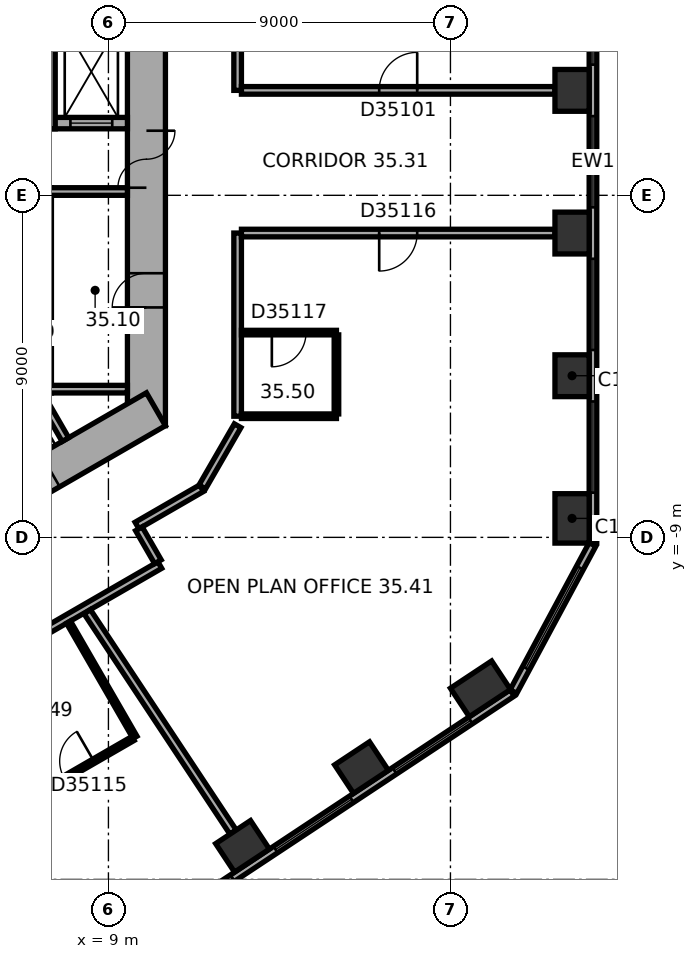
"""IFC4 building model, lengths in metres.
Left out: names, types, materials, properties, quantities, classifications, styles, units other than length and angle.
Written with IfcOpenShell. Run it as: python <this file> out.ifc"""

import sys

from ifc_helpers import new_model, si_unit, direction, frame, frame_2d, origin, origin_2d, place, context, subcontext, project, spatial, rectangle, extrude, element, fill, save


model = new_model("IFC4")
c1 = context("Model", 3, precision=1e-05, world=origin(), true_north=direction((0.0, 1.0)))
c2 = subcontext(c1, "Body", "Model", "MODEL_VIEW")
j1 = project(units=[si_unit("LENGTHUNIT", "METRE"), si_unit("PLANEANGLEUNIT", "RADIAN")], contexts=[c1])
p1 = place(None, origin())
s1 = spatial("IfcSite", under=j1, at=p1, CompositionType="ELEMENT")
p2 = place(p1, origin())
s2 = spatial("IfcBuilding", under=s1, at=p2, CompositionType="ELEMENT")
p3 = place(p2, frame((0.0, 0.0, 146.6)))
s3 = spatial("IfcBuildingStorey", under=s2, at=p3, CompositionType="ELEMENT", Elevation=146.6)
p4 = place(p3, frame((21.2, -8.501, 0.0), z_axis=(0.0, 0.0, 1.0), x_axis=(0.0, 1.0, 0.0)))
e1 = element("IfcColumn", 1, at=p4, inside=s3, PredefinedType="COLUMN", context=c2, shape_type="SweptSolid", body=[
    extrude(rectangle(XDim=1.3, YDim=0.9, at=origin_2d()), origin(), (0.0, 0.0, 1.0), 3.7),
])
for number, where, z_axis, x_axis in (
    (2, (21.2, -4.747, 0.0), (0.0, 0.0, 1.0), (0.0, 1.0, 0.0)),
    (3, (21.2, -0.993, 0.0), (0.0, 0.0, 1.0), (0.0, 1.0, 0.0)),
    (4, (21.2, 2.761, 0.0), (0.0, 0.0, 1.0), (0.0, 1.0, 0.0)),
    (5, (12.529, -17.13, 0.0), (0.0, 0.0, 1.0), (0.834, 0.552, 0.0)),
    (6, (15.659, -15.058, 0.0), (0.0, 0.0, 1.0), (0.834, 0.552, 0.0)),
):
    element("IfcColumn", number, at=place(p3, frame(where, z_axis=z_axis, x_axis=x_axis)), inside=s3, PredefinedType="COLUMN", context=c2, shape_type="SweptSolid", body=[
        extrude(rectangle(XDim=1.1, YDim=0.9, at=origin_2d()), origin(), (0.0, 0.0, 1.0), 3.7),
    ])
p5 = place(p3, frame((18.79, -12.986, 0.0), z_axis=(0.0, 0.0, 1.0), x_axis=(0.833885822067, 0.551936985312, 0.0)))
e7 = element("IfcColumn", 7, at=p5, inside=s3, PredefinedType="COLUMN", context=c2, shape_type="SweptSolid", body=[
    extrude(rectangle(XDim=1.3, YDim=0.9, at=origin_2d()), origin(), (0.0, 0.0, 1.0), 3.7),
])
p6 = place(p3, frame((10.0, -6.062, 0.0), z_axis=(0.0, 0.0, 1.0), x_axis=(0.0, 1.0, 0.0)))
e8 = element("IfcWall", 8, at=p6, inside=s3, PredefinedType="SHEAR", context=c2, shape_type="SweptSolid", body=[
    extrude(rectangle(XDim=12.125, YDim=1.0, at=frame_2d((6.062, 0.0))), origin(), (0.0, 0.0, 1.0), 3.7),
])
p7 = place(p6, frame((6.262, 0.0, 0.0)))
e9 = element("IfcOpeningElement", 9, at=p7, cuts=e8, PredefinedType="OPENING", context=c2, shape_type="SweptSolid", body=[
    extrude(rectangle(XDim=1.5, YDim=2.1, at=frame_2d((0.75, 1.05))), frame((0.0, 0.51, 0.0), z_axis=(0.0, -1.0, 0.0), x_axis=(1.0, 0.0, 0.0)), (0.0, 0.0, 1.0), 1.02),
])
p8 = place(p6, frame((3.112, 0.0, 0.0)))
e10 = element("IfcOpeningElement", 10, at=p8, cuts=e8, PredefinedType="OPENING", context=c2, shape_type="SweptSolid", body=[
    extrude(rectangle(XDim=0.9, YDim=2.1, at=frame_2d((0.45, 1.05))), frame((0.0, 0.51, 0.0), z_axis=(0.0, -1.0, 0.0), x_axis=(1.0, 0.0, 0.0)), (0.0, 0.0, 1.0), 1.02),
])
p9 = place(p3, frame((-0.25, -11.691, 0.0), z_axis=(0.0, 0.0, 1.0), x_axis=(0.866022616891, 0.50000482701, 0.0)))
e11 = element("IfcWall", 11, at=p9, inside=s3, PredefinedType="SHEAR", context=c2, shape_type="SweptSolid", body=[
    extrude(rectangle(XDim=12.125, YDim=1.0, at=frame_2d((6.062, 0.0))), origin(), (0.0, 0.0, 1.0), 3.7),
])
p10 = place(p9, frame((2.612, 0.0, 0.0)))
e12 = element("IfcOpeningElement", 12, at=p10, cuts=e11, PredefinedType="OPENING", context=c2, shape_type="SweptSolid", body=[
    extrude(rectangle(XDim=1.1, YDim=2.1, at=frame_2d((0.55, 1.05))), frame((0.0, 0.51, 0.0), z_axis=(0.0, -1.0, 0.0), x_axis=(1.0, 0.0, 0.0)), (0.0, 0.0, 1.0), 1.02),
])
p11 = place(p9, frame((5.212, 0.0, 0.0)))
e13 = element("IfcOpeningElement", 13, at=p11, cuts=e11, PredefinedType="OPENING", context=c2, shape_type="SweptSolid", body=[
    extrude(rectangle(XDim=1.1, YDim=2.1, at=frame_2d((0.55, 1.05))), frame((0.0, 0.51, 0.0), z_axis=(0.0, -1.0, 0.0), x_axis=(1.0, 0.0, 0.0)), (0.0, 0.0, 1.0), 1.02),
])
p12 = place(p9, frame((7.812, 0.0, 0.0)))
e14 = element("IfcOpeningElement", 14, at=p12, cuts=e11, PredefinedType="OPENING", context=c2, shape_type="SweptSolid", body=[
    extrude(rectangle(XDim=1.1, YDim=2.1, at=frame_2d((0.55, 1.05))), frame((0.0, 0.51, 0.0), z_axis=(0.0, -1.0, 0.0), x_axis=(1.0, 0.0, 0.0)), (0.0, 0.0, 1.0), 1.02),
])
p13 = place(p3, frame((21.75, -9.138, 0.0), z_axis=(0.0, 0.0, 1.0), x_axis=(0.0, 1.0, 0.0)))
e15 = element("IfcWall", 15, at=p13, inside=s3, PredefinedType="STANDARD", context=c2, shape_type="SweptSolid", body=[
    extrude(rectangle(XDim=20.044, YDim=0.2, at=frame_2d((10.022, 0.0))), origin(), (0.0, 0.0, 1.0), 3.7),
])
p14 = place(p13, frame((1.314, 0.0, 0.9)))
e16 = element("IfcOpeningElement", 16, at=p14, cuts=e15, PredefinedType="OPENING", context=c2, shape_type="SweptSolid", body=[
    extrude(rectangle(XDim=2.4, YDim=2.0, at=frame_2d((1.2, 1.0))), frame((0.0, 0.11, 0.0), z_axis=(0.0, -1.0, 0.0), x_axis=(1.0, 0.0, 0.0)), (0.0, 0.0, 1.0), 0.22),
])
p15 = place(p13, frame((5.069, 0.0, 0.9)))
e17 = element("IfcOpeningElement", 17, at=p15, cuts=e15, PredefinedType="OPENING", context=c2, shape_type="SweptSolid", body=[
    extrude(rectangle(XDim=2.4, YDim=2.0, at=frame_2d((1.2, 1.0))), frame((0.0, 0.11, 0.0), z_axis=(0.0, -1.0, 0.0), x_axis=(1.0, 0.0, 0.0)), (0.0, 0.0, 1.0), 0.22),
])
p16 = place(p13, frame((8.823, 0.0, 0.9)))
e18 = element("IfcOpeningElement", 18, at=p16, cuts=e15, PredefinedType="OPENING", context=c2, shape_type="SweptSolid", body=[
    extrude(rectangle(XDim=2.4, YDim=2.0, at=frame_2d((1.2, 1.0))), frame((0.0, 0.11, 0.0), z_axis=(0.0, -1.0, 0.0), x_axis=(1.0, 0.0, 0.0)), (0.0, 0.0, 1.0), 0.22),
])
p17 = place(p13, frame((12.577, 0.0, 0.9)))
e19 = element("IfcOpeningElement", 19, at=p17, cuts=e15, PredefinedType="OPENING", context=c2, shape_type="SweptSolid", body=[
    extrude(rectangle(XDim=2.4, YDim=2.0, at=frame_2d((1.2, 1.0))), frame((0.0, 0.11, 0.0), z_axis=(0.0, -1.0, 0.0), x_axis=(1.0, 0.0, 0.0)), (0.0, 0.0, 1.0), 0.22),
])
p18 = place(p13, frame((16.331, 0.0, 0.9)))
e20 = element("IfcOpeningElement", 20, at=p18, cuts=e15, PredefinedType="OPENING", context=c2, shape_type="SweptSolid", body=[
    extrude(rectangle(XDim=2.4, YDim=2.0, at=frame_2d((1.2, 1.0))), frame((0.0, 0.11, 0.0), z_axis=(0.0, -1.0, 0.0), x_axis=(1.0, 0.0, 0.0)), (0.0, 0.0, 1.0), 0.22),
])
p19 = place(p3, frame((2.911, -24.156, 0.0), z_axis=(0.0, 0.0, 1.0), x_axis=(0.833882163564, 0.551942512668, 0.0)))
e21 = element("IfcWall", 21, at=p19, inside=s3, PredefinedType="STANDARD", context=c2, shape_type="SweptSolid", body=[
    extrude(rectangle(XDim=20.044, YDim=0.2, at=frame_2d((10.022, 0.0))), origin(), (0.0, 0.0, 1.0), 3.7),
])
p20 = place(p19, frame((1.313, 0.0, 0.9)))
e22 = element("IfcOpeningElement", 22, at=p20, cuts=e21, PredefinedType="OPENING", context=c2, shape_type="SweptSolid", body=[
    extrude(rectangle(XDim=2.4, YDim=2.0, at=frame_2d((1.2, 1.0))), frame((0.0, 0.11, 0.0), z_axis=(0.0, -1.0, 0.0), x_axis=(1.0, 0.0, 0.0)), (0.0, 0.0, 1.0), 0.22),
])
p21 = place(p19, frame((5.067, 0.0, 0.9)))
e23 = element("IfcOpeningElement", 23, at=p21, cuts=e21, PredefinedType="OPENING", context=c2, shape_type="SweptSolid", body=[
    extrude(rectangle(XDim=2.4, YDim=2.0, at=frame_2d((1.2, 1.0))), frame((0.0, 0.11, 0.0), z_axis=(0.0, -1.0, 0.0), x_axis=(1.0, 0.0, 0.0)), (0.0, 0.0, 1.0), 0.22),
])
p22 = place(p19, frame((8.821, 0.0, 0.9)))
e24 = element("IfcOpeningElement", 24, at=p22, cuts=e21, PredefinedType="OPENING", context=c2, shape_type="SweptSolid", body=[
    extrude(rectangle(XDim=2.4, YDim=2.0, at=frame_2d((1.2, 1.0))), frame((0.0, 0.11, 0.0), z_axis=(0.0, -1.0, 0.0), x_axis=(1.0, 0.0, 0.0)), (0.0, 0.0, 1.0), 0.22),
])
p23 = place(p19, frame((12.575, 0.0, 0.9)))
e25 = element("IfcOpeningElement", 25, at=p23, cuts=e21, PredefinedType="OPENING", context=c2, shape_type="SweptSolid", body=[
    extrude(rectangle(XDim=2.4, YDim=2.0, at=frame_2d((1.2, 1.0))), frame((0.0, 0.11, 0.0), z_axis=(0.0, -1.0, 0.0), x_axis=(1.0, 0.0, 0.0)), (0.0, 0.0, 1.0), 0.22),
])
p24 = place(p19, frame((16.329, 0.0, 0.9)))
e26 = element("IfcOpeningElement", 26, at=p24, cuts=e21, PredefinedType="OPENING", context=c2, shape_type="SweptSolid", body=[
    extrude(rectangle(XDim=2.4, YDim=2.0, at=frame_2d((1.2, 1.0))), frame((0.0, 0.11, 0.0), z_axis=(0.0, -1.0, 0.0), x_axis=(1.0, 0.0, 0.0)), (0.0, 0.0, 1.0), 0.22),
])
p25 = place(p3, frame((19.658, -13.057, 0.0), z_axis=(0.0, 0.0, 1.0), x_axis=(0.473307879841, 0.880897071672, 0.0)))
e27 = element("IfcWall", 27, at=p25, inside=s3, PredefinedType="STANDARD", context=c2, shape_type="SweptSolid", body=[
    extrude(rectangle(XDim=4.395, YDim=0.2, at=frame_2d((2.197, 0.0))), origin(), (0.0, 0.0, 1.0), 3.7),
])
p26 = place(p25, frame((0.698, 0.0, 0.9)))
e28 = element("IfcOpeningElement", 28, at=p26, cuts=e27, PredefinedType="OPENING", context=c2, shape_type="SweptSolid", body=[
    extrude(rectangle(XDim=3.0, YDim=2.0, at=frame_2d((1.5, 1.0))), frame((0.0, 0.11, 0.0), z_axis=(0.0, -1.0, 0.0), x_axis=(1.0, 0.0, 0.0)), (0.0, 0.0, 1.0), 0.22),
])
for number, where, z_axis, x_axis in (
    (29, (7.3, -5.1, 0.0), (0.0, 0.0, 1.0), (1.0, 0.0, 0.0)),
    (30, (7.3, 0.1, 0.0), (0.0, 0.0, 1.0), (1.0, 0.0, 0.0)),
    (31, (6.768, -4.522, 0.0), (0.0, 0.0, 1.0), (0.5, -0.866, 0.0)),
):
    element("IfcWall", number, at=place(p3, frame(where, z_axis=z_axis, x_axis=x_axis)), inside=s3, PredefinedType="PARTITIONING", context=c2, shape_type="SweptSolid", body=[
        extrude(rectangle(XDim=2.2, YDim=0.2, at=frame_2d((1.1, 0.0))), origin(), (0.0, 0.0, 1.0), 3.42),
    ])
p27 = place(p3, frame((7.3, 1.9, 0.0), z_axis=(0.0, 0.0, 1.0), x_axis=(1.0, 0.0, 0.0)))
e32 = element("IfcWall", 32, at=p27, inside=s3, PredefinedType="SHEAR", context=c2, shape_type="SweptSolid", body=[
    extrude(rectangle(XDim=2.2, YDim=0.3, at=frame_2d((1.1, 0.0))), origin(), (0.0, 0.0, 1.0), 3.42),
])
p28 = place(p27, frame((0.7, 0.0, 0.0)))
e33 = element("IfcOpeningElement", 33, at=p28, cuts=e32, PredefinedType="OPENING", context=c2, shape_type="SweptSolid", body=[
    extrude(rectangle(XDim=1.1, YDim=2.1, at=frame_2d((0.55, 1.05))), frame((0.0, 0.16, 0.0), z_axis=(0.0, -1.0, 0.0), x_axis=(1.0, 0.0, 0.0)), (0.0, 0.0, 1.0), 0.32),
])
p29 = place(p3, frame((7.45, 1.75, 0.0), z_axis=(0.0, 0.0, 1.0), x_axis=(0.0, 1.0, 0.0)))
e34 = element("IfcWall", 34, at=p29, inside=s3, PredefinedType="SHEAR", context=c2, shape_type="SweptSolid", body=[
    extrude(rectangle(XDim=3.35, YDim=0.3, at=frame_2d((1.675, 0.0))), origin(), (0.0, 0.0, 1.0), 3.42),
])
p30 = place(p3, frame((4.955, -12.844, 0.0), z_axis=(0.0, 0.0, 1.0), x_axis=(0.86602379309, 0.500002789795, 0.0)))
e35 = element("IfcWall", 35, at=p30, inside=s3, PredefinedType="PARTITIONING", context=c2, shape_type="SweptSolid", body=[
    extrude(rectangle(XDim=6.232, YDim=0.2, at=frame_2d((3.116, 0.0))), origin(), (0.0, 0.0, 1.0), 3.42),
])
p31 = place(p3, frame((7.949, -11.231, 0.0), z_axis=(0.0, 0.0, 1.0), x_axis=(0.500010275428, -0.866019471182, 0.0)))
e36 = element("IfcWall", 36, at=p31, inside=s3, PredefinedType="PARTITIONING", context=c2, shape_type="SweptSolid", body=[
    extrude(rectangle(XDim=3.5, YDim=0.12, at=frame_2d((1.75, 0.0))), origin(), (0.0, 0.0, 1.0), 3.42),
])
p32 = place(p3, frame((9.647, -14.292, 0.0), z_axis=(0.0, 0.0, 1.0), x_axis=(-0.866040564224, -0.499973740429, 0.0)))
e37 = element("IfcWall", 37, at=p32, inside=s3, PredefinedType="PARTITIONING", context=c2, shape_type="SweptSolid", body=[
    extrude(rectangle(XDim=3.28, YDim=0.12, at=frame_2d((1.64, 0.0))), origin(), (0.0, 0.0, 1.0), 3.42),
])
p33 = place(p32, frame((1.19, 0.0, 0.0)))
e38 = element("IfcOpeningElement", 38, at=p33, cuts=e37, PredefinedType="OPENING", context=c2, shape_type="SweptSolid", body=[
    extrude(rectangle(XDim=0.9, YDim=2.1, at=frame_2d((0.45, 1.05))), frame((0.0, 0.07, 0.0), z_axis=(0.0, -1.0, 0.0), x_axis=(1.0, 0.0, 0.0)), (0.0, 0.0, 1.0), 0.14),
])
p34 = place(p3, frame((9.752, -8.688, 0.0), z_axis=(0.0, 0.0, 1.0), x_axis=(0.865974105138, 0.500088841337, 0.0)))
e39 = element("IfcWall", 39, at=p34, inside=s3, PredefinedType="PARTITIONING", context=c2, shape_type="SweptSolid", body=[
    extrude(rectangle(XDim=1.961, YDim=0.2, at=frame_2d((0.98, 0.0))), origin(), (0.0, 0.0, 1.0), 3.42),
])
p35 = place(p3, frame((10.302, -9.642, 0.0), z_axis=(0.0, 0.0, 1.0), x_axis=(-0.500074377092, 0.865982457891, 0.0)))
e40 = element("IfcWall", 40, at=p35, inside=s3, PredefinedType="PARTITIONING", context=c2, shape_type="SweptSolid", body=[
    extrude(rectangle(XDim=1.001, YDim=0.2, at=frame_2d((0.5, 0.0))), origin(), (0.0, 0.0, 1.0), 3.42),
])
p36 = place(p3, frame((11.47, -7.673, 0.0), z_axis=(0.0, 0.0, 1.0), x_axis=(0.499964847546, 0.866045698112, 0.0)))
e41 = element("IfcWall", 41, at=p36, inside=s3, PredefinedType="PARTITIONING", context=c2, shape_type="SweptSolid", body=[
    extrude(rectangle(XDim=1.86, YDim=0.2, at=frame_2d((0.93, 0.0))), origin(), (0.0, 0.0, 1.0), 3.42),
])
p37 = place(p3, frame((12.281, -16.755, 0.0), z_axis=(0.0, 0.0, 1.0), x_axis=(-0.551925794663, 0.833893228888, 0.0)))
e42 = element("IfcWall", 42, at=p37, inside=s3, PredefinedType="PARTITIONING", context=c2, shape_type="SweptSolid", body=[
    extrude(rectangle(XDim=6.953, YDim=0.2, at=frame_2d((3.476, 0.0))), origin(), (0.0, 0.0, 1.0), 3.42),
])
p38 = place(p3, frame((12.4, -5.812, 0.0), z_axis=(0.0, 0.0, 1.0), x_axis=(0.0, 1.0, 0.0)))
e43 = element("IfcWall", 43, at=p38, inside=s3, PredefinedType="PARTITIONING", context=c2, shape_type="SweptSolid", body=[
    extrude(rectangle(XDim=4.819, YDim=0.2, at=frame_2d((2.41, 0.0))), origin(), (0.0, 0.0, 1.0), 3.42),
])
p39 = place(p3, frame((12.4, 2.761, 0.0), z_axis=(0.0, 0.0, 1.0), x_axis=(0.0, 1.0, 0.0)))
e44 = element("IfcWall", 44, at=p39, inside=s3, PredefinedType="PARTITIONING", context=c2, shape_type="SweptSolid", body=[
    extrude(rectangle(XDim=3.301, YDim=0.2, at=frame_2d((1.65, 0.0))), origin(), (0.0, 0.0, 1.0), 3.42),
])
p40 = place(p3, frame((12.5, -3.612, 0.0), z_axis=(0.0, 0.0, 1.0), x_axis=(1.0, 0.0, 0.0)))
e45 = element("IfcWall", 45, at=p40, inside=s3, PredefinedType="PARTITIONING", context=c2, shape_type="SweptSolid", body=[
    extrude(rectangle(XDim=2.5, YDim=0.12, at=frame_2d((1.25, 0.0))), origin(), (0.0, 0.0, 1.0), 3.42),
])
p41 = place(p40, frame((0.8, 0.0, 0.0)))
e46 = element("IfcOpeningElement", 46, at=p41, cuts=e45, PredefinedType="OPENING", context=c2, shape_type="SweptSolid", body=[
    extrude(rectangle(XDim=0.9, YDim=2.1, at=frame_2d((0.45, 1.05))), frame((0.0, 0.07, 0.0), z_axis=(0.0, -1.0, 0.0), x_axis=(1.0, 0.0, 0.0)), (0.0, 0.0, 1.0), 0.14),
])
p42 = place(p3, frame((12.5, -0.993, 0.0), z_axis=(0.0, 0.0, 1.0), x_axis=(1.0, 0.0, 0.0)))
e47 = element("IfcWall", 47, at=p42, inside=s3, PredefinedType="PARTITIONING", context=c2, shape_type="SweptSolid", body=[
    extrude(rectangle(XDim=8.25, YDim=0.2, at=frame_2d((4.125, 0.0))), origin(), (0.0, 0.0, 1.0), 2.87),
])
p43 = place(p42, frame((3.625, 0.0, 0.0)))
e48 = element("IfcOpeningElement", 48, at=p43, cuts=e47, PredefinedType="OPENING", context=c2, shape_type="SweptSolid", body=[
    extrude(rectangle(XDim=1.0, YDim=2.1, at=frame_2d((0.5, 1.05))), frame((0.0, 0.11, 0.0), z_axis=(0.0, -1.0, 0.0), x_axis=(1.0, 0.0, 0.0)), (0.0, 0.0, 1.0), 0.22),
])
p44 = place(p3, frame((15.0, -5.812, 0.0), z_axis=(0.0, 0.0, 1.0), x_axis=(-1.0, 0.0, 0.0)))
e49 = element("IfcWall", 49, at=p44, inside=s3, PredefinedType="PARTITIONING", context=c2, shape_type="SweptSolid", body=[
    extrude(rectangle(XDim=2.5, YDim=0.12, at=frame_2d((1.25, 0.0))), origin(), (0.0, 0.0, 1.0), 3.42),
])
p45 = place(p3, frame((15.0, -3.672, 0.0), z_axis=(0.0, 0.0, 1.0), x_axis=(0.0, -1.0, 0.0)))
e50 = element("IfcWall", 50, at=p45, inside=s3, PredefinedType="PARTITIONING", context=c2, shape_type="SweptSolid", body=[
    extrude(rectangle(XDim=2.08, YDim=0.12, at=frame_2d((1.04, 0.0))), origin(), (0.0, 0.0, 1.0), 3.42),
])
p46 = place(p3, frame((20.75, 2.761, 0.0), z_axis=(0.0, 0.0, 1.0), x_axis=(-1.0, 0.0, 0.0)))
e51 = element("IfcWall", 51, at=p46, inside=s3, PredefinedType="PARTITIONING", context=c2, shape_type="SweptSolid", body=[
    extrude(rectangle(XDim=8.25, YDim=0.2, at=frame_2d((4.125, 0.0))), origin(), (0.0, 0.0, 1.0), 3.42),
])
p47 = place(p46, frame((3.625, 0.0, 0.0)))
e52 = element("IfcOpeningElement", 52, at=p47, cuts=e51, PredefinedType="OPENING", context=c2, shape_type="SweptSolid", body=[
    extrude(rectangle(XDim=1.0, YDim=2.1, at=frame_2d((0.5, 1.05))), frame((0.0, 0.11, 0.0), z_axis=(0.0, -1.0, 0.0), x_axis=(1.0, 0.0, 0.0)), (0.0, 0.0, 1.0), 0.22),
])
p48 = place(p14, origin())
e53 = element("IfcWindow", 53, at=p48, inside=s3, PartitioningType="SINGLE_PANEL", PredefinedType="WINDOW", context=c2, shape_type="SweptSolid", body=[
    extrude(rectangle(XDim=2.4, YDim=2.0, at=frame_2d((1.2, 1.0))), frame((0.0, 0.03, 0.0), z_axis=(0.0, -1.0, 0.0), x_axis=(1.0, 0.0, 0.0)), (0.0, 0.0, 1.0), 0.06),
])
fill(e16, e53)
p49 = place(p15, origin())
e54 = element("IfcWindow", 54, at=p49, inside=s3, PartitioningType="SINGLE_PANEL", PredefinedType="WINDOW", context=c2, shape_type="SweptSolid", body=[
    extrude(rectangle(XDim=2.4, YDim=2.0, at=frame_2d((1.2, 1.0))), frame((0.0, 0.03, 0.0), z_axis=(0.0, -1.0, 0.0), x_axis=(1.0, 0.0, 0.0)), (0.0, 0.0, 1.0), 0.06),
])
fill(e17, e54)
p50 = place(p16, origin())
e55 = element("IfcWindow", 55, at=p50, inside=s3, PartitioningType="SINGLE_PANEL", PredefinedType="WINDOW", context=c2, shape_type="SweptSolid", body=[
    extrude(rectangle(XDim=2.4, YDim=2.0, at=frame_2d((1.2, 1.0))), frame((0.0, 0.03, 0.0), z_axis=(0.0, -1.0, 0.0), x_axis=(1.0, 0.0, 0.0)), (0.0, 0.0, 1.0), 0.06),
])
fill(e18, e55)
p51 = place(p17, origin())
e56 = element("IfcWindow", 56, at=p51, inside=s3, PartitioningType="SINGLE_PANEL", PredefinedType="WINDOW", context=c2, shape_type="SweptSolid", body=[
    extrude(rectangle(XDim=2.4, YDim=2.0, at=frame_2d((1.2, 1.0))), frame((0.0, 0.03, 0.0), z_axis=(0.0, -1.0, 0.0), x_axis=(1.0, 0.0, 0.0)), (0.0, 0.0, 1.0), 0.06),
])
fill(e19, e56)
p52 = place(p22, origin())
e57 = element("IfcWindow", 57, at=p52, inside=s3, PartitioningType="SINGLE_PANEL", PredefinedType="WINDOW", context=c2, shape_type="SweptSolid", body=[
    extrude(rectangle(XDim=2.4, YDim=2.0, at=frame_2d((1.2, 1.0))), frame((0.0, 0.03, 0.0), z_axis=(0.0, -1.0, 0.0), x_axis=(1.0, 0.0, 0.0)), (0.0, 0.0, 1.0), 0.06),
])
fill(e24, e57)
p53 = place(p23, origin())
e58 = element("IfcWindow", 58, at=p53, inside=s3, PartitioningType="SINGLE_PANEL", PredefinedType="WINDOW", context=c2, shape_type="SweptSolid", body=[
    extrude(rectangle(XDim=2.4, YDim=2.0, at=frame_2d((1.2, 1.0))), frame((0.0, 0.03, 0.0), z_axis=(0.0, -1.0, 0.0), x_axis=(1.0, 0.0, 0.0)), (0.0, 0.0, 1.0), 0.06),
])
fill(e25, e58)
p54 = place(p24, origin())
e59 = element("IfcWindow", 59, at=p54, inside=s3, PartitioningType="SINGLE_PANEL", PredefinedType="WINDOW", context=c2, shape_type="SweptSolid", body=[
    extrude(rectangle(XDim=2.4, YDim=2.0, at=frame_2d((1.2, 1.0))), frame((0.0, 0.03, 0.0), z_axis=(0.0, -1.0, 0.0), x_axis=(1.0, 0.0, 0.0)), (0.0, 0.0, 1.0), 0.06),
])
fill(e26, e59)
p55 = place(p26, origin())
e60 = element("IfcWindow", 60, at=p55, inside=s3, PartitioningType="SINGLE_PANEL", PredefinedType="WINDOW", context=c2, shape_type="SweptSolid", body=[
    extrude(rectangle(XDim=3.0, YDim=2.0, at=frame_2d((1.5, 1.0))), frame((0.0, 0.03, 0.0), z_axis=(0.0, -1.0, 0.0), x_axis=(1.0, 0.0, 0.0)), (0.0, 0.0, 1.0), 0.06),
])
fill(e28, e60)
p56 = place(p7, origin())
e61 = element("IfcDoor", 61, at=p56, inside=s3, OperationType="DOUBLE_DOOR_SINGLE_SWING", PredefinedType="DOOR", context=c2, shape_type="SweptSolid", body=[
    extrude(rectangle(XDim=1.5, YDim=2.1, at=frame_2d((0.75, 1.05))), frame((0.0, 0.025, 0.0), z_axis=(0.0, -1.0, 0.0), x_axis=(1.0, 0.0, 0.0)), (0.0, 0.0, 1.0), 0.05),
])
fill(e9, e61)
p57 = place(p8, origin())
e62 = element("IfcDoor", 62, at=p57, inside=s3, OperationType="SINGLE_SWING_LEFT", PredefinedType="DOOR", context=c2, shape_type="SweptSolid", body=[
    extrude(rectangle(XDim=0.9, YDim=2.1, at=frame_2d((0.45, 1.05))), frame((0.0, 0.025, 0.0), z_axis=(0.0, -1.0, 0.0), x_axis=(1.0, 0.0, 0.0)), (0.0, 0.0, 1.0), 0.05),
])
fill(e10, e62)
p58 = place(p28, origin())
e63 = element("IfcDoor", 63, at=p58, inside=s3, OperationType="DOUBLE_DOOR_SLIDING", PredefinedType="DOOR", context=c2, shape_type="SweptSolid", body=[
    extrude(rectangle(XDim=1.1, YDim=2.1, at=frame_2d((0.55, 1.05))), frame((0.0, 0.025, 0.0), z_axis=(0.0, -1.0, 0.0), x_axis=(1.0, 0.0, 0.0)), (0.0, 0.0, 1.0), 0.05),
])
fill(e33, e63)
p59 = place(p47, origin())
e64 = element("IfcDoor", 64, at=p59, inside=s3, OperationType="SINGLE_SWING_LEFT", PredefinedType="DOOR", context=c2, shape_type="SweptSolid", body=[
    extrude(rectangle(XDim=1.0, YDim=2.1, at=frame_2d((0.5, 1.05))), frame((0.0, 0.025, 0.0), z_axis=(0.0, -1.0, 0.0), x_axis=(1.0, 0.0, 0.0)), (0.0, 0.0, 1.0), 0.05),
])
fill(e52, e64)
p60 = place(p33, origin())
e65 = element("IfcDoor", 65, at=p60, inside=s3, OperationType="SINGLE_SWING_LEFT", PredefinedType="DOOR", context=c2, shape_type="SweptSolid", body=[
    extrude(rectangle(XDim=0.9, YDim=2.1, at=frame_2d((0.45, 1.05))), frame((0.0, 0.025, 0.0), z_axis=(0.0, -1.0, 0.0), x_axis=(1.0, 0.0, 0.0)), (0.0, 0.0, 1.0), 0.05),
])
fill(e38, e65)
p61 = place(p43, origin())
e66 = element("IfcDoor", 66, at=p61, inside=s3, OperationType="SINGLE_SWING_LEFT", PredefinedType="DOOR", context=c2, shape_type="SweptSolid", body=[
    extrude(rectangle(XDim=1.0, YDim=2.1, at=frame_2d((0.5, 1.05))), frame((0.0, 0.025, 0.0), z_axis=(0.0, -1.0, 0.0), x_axis=(1.0, 0.0, 0.0)), (0.0, 0.0, 1.0), 0.05),
])
fill(e48, e66)
p62 = place(p41, origin())
e67 = element("IfcDoor", 67, at=p62, inside=s3, OperationType="SINGLE_SWING_LEFT", PredefinedType="DOOR", context=c2, shape_type="SweptSolid", body=[
    extrude(rectangle(XDim=0.9, YDim=2.1, at=frame_2d((0.45, 1.05))), frame((0.0, 0.025, 0.0), z_axis=(0.0, -1.0, 0.0), x_axis=(1.0, 0.0, 0.0)), (0.0, 0.0, 1.0), 0.05),
])
fill(e46, e67)
save(model, sys.argv[1])
